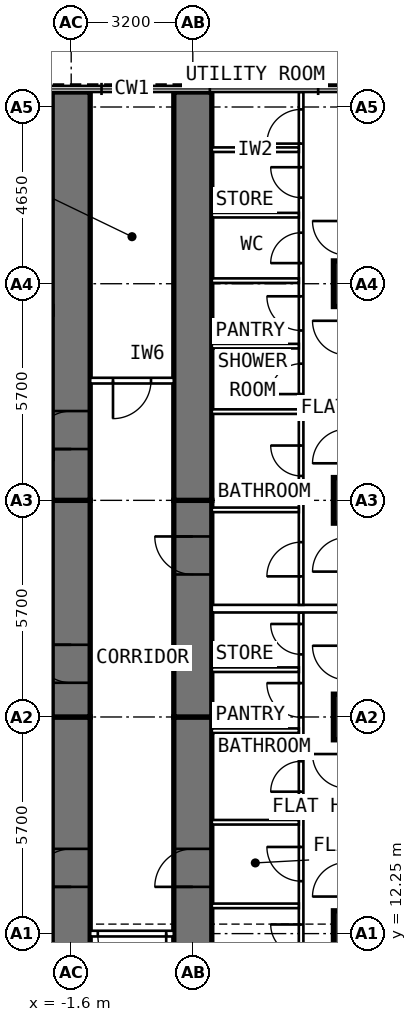
"""IFC4 building model, lengths in metres.
Left out: names, types, materials, properties, quantities, classifications, styles, units other than length and angle.
Written with IfcOpenShell. Run it as: python <this file> out.ifc"""

import sys

from ifc_helpers import new_model, si_unit, direction, frame, frame_2d, origin, origin_2d, place, context, subcontext, project, spatial, rectangle, extrude, element, fill, save


model = new_model("IFC4")
c1 = context("Model", 3, precision=1e-05, world=origin(), true_north=direction((0.0, 1.0)))
c2 = subcontext(c1, "Body", "Model", "MODEL_VIEW")
j1 = project(units=[si_unit("LENGTHUNIT", "METRE"), si_unit("PLANEANGLEUNIT", "RADIAN")], contexts=[c1])
p1 = place(None, origin())
s1 = spatial("IfcSite", under=j1, at=p1, CompositionType="ELEMENT")
p2 = place(p1, origin())
s2 = spatial("IfcBuilding", under=s1, at=p2, CompositionType="ELEMENT")
p3 = place(p2, frame((0.0, 0.0, 80.8)))
s3 = spatial("IfcBuildingStorey", under=s2, at=p3, CompositionType="ELEMENT", Elevation=80.8)
for number, where, z_axis, x_axis in (
    (1, (5.9, 12.25, 0.0), (0.0, 0.0, 1.0), (0.0, 1.0, 0.0)),
    (2, (5.9, 17.95, 0.0), (0.0, 0.0, 1.0), (0.0, 1.0, 0.0)),
    (3, (5.9, 23.65, 0.0), (0.0, 0.0, 1.0), (0.0, 1.0, 0.0)),
    (4, (5.9, 29.35, 0.0), (0.0, 0.0, 1.0), (0.0, 1.0, 0.0)),
):
    element("IfcColumn", number, at=place(p3, frame(where, z_axis=z_axis, x_axis=x_axis)), inside=s3, PredefinedType="COLUMN", context=c2, shape_type="SweptSolid", body=[
        extrude(rectangle(XDim=1.2, YDim=1.2, at=origin_2d()), origin(), (0.0, 0.0, 1.0), 3.6),
    ])
p4 = place(p3, frame((-1.6, 9.6, 0.0), z_axis=(0.0, 0.0, 1.0), x_axis=(0.0, 1.0, 0.0)))
e5 = element("IfcWall", 5, at=p4, inside=s3, PredefinedType="SHEAR", context=c2, shape_type="SweptSolid", body=[
    extrude(rectangle(XDim=8.35, YDim=1.0, at=frame_2d((4.175, 0.0))), origin(), (0.0, 0.0, 1.0), 3.6),
])
p5 = place(p4, frame((3.88, 0.0, 0.0)))
e6 = element("IfcOpeningElement", 6, at=p5, cuts=e5, PredefinedType="OPENING", context=c2, shape_type="SweptSolid", body=[
    extrude(rectangle(XDim=1.0, YDim=2.1, at=frame_2d((0.5, 1.05))), frame((0.0, 0.512, 0.0), z_axis=(0.0, -1.0, 0.0), x_axis=(1.0, 0.0, 0.0)), (0.0, 0.0, 1.0), 1.024),
])
p6 = place(p3, frame((-1.6, 17.95, 0.0), z_axis=(0.0, 0.0, 1.0), x_axis=(0.0, 1.0, 0.0)))
e7 = element("IfcWall", 7, at=p6, inside=s3, PredefinedType="SHEAR", context=c2, shape_type="SweptSolid", body=[
    extrude(rectangle(XDim=5.7, YDim=1.0, at=frame_2d((2.85, 0.0))), origin(), (0.0, 0.0, 1.0), 3.6),
])
p7 = place(p6, frame((0.9, 0.0, 0.0)))
e8 = element("IfcOpeningElement", 8, at=p7, cuts=e7, PredefinedType="OPENING", context=c2, shape_type="SweptSolid", body=[
    extrude(rectangle(XDim=1.0, YDim=2.1, at=frame_2d((0.5, 1.05))), frame((0.0, 0.512, 0.0), z_axis=(0.0, -1.0, 0.0), x_axis=(1.0, 0.0, 0.0)), (0.0, 0.0, 1.0), 1.024),
])
p8 = place(p3, frame((-1.6, 23.65, 0.0), z_axis=(0.0, 0.0, 1.0), x_axis=(0.0, 1.0, 0.0)))
e9 = element("IfcWall", 9, at=p8, inside=s3, PredefinedType="SHEAR", context=c2, shape_type="SweptSolid", body=[
    extrude(rectangle(XDim=10.745, YDim=1.0, at=frame_2d((5.373, 0.0))), origin(), (0.0, 0.0, 1.0), 3.6),
])
p9 = place(p8, frame((1.35, 0.0, 0.0)))
e10 = element("IfcOpeningElement", 10, at=p9, cuts=e9, PredefinedType="OPENING", context=c2, shape_type="SweptSolid", body=[
    extrude(rectangle(XDim=1.0, YDim=2.1, at=frame_2d((0.5, 1.05))), frame((0.0, 0.512, 0.0), z_axis=(0.0, -1.0, 0.0), x_axis=(1.0, 0.0, 0.0)), (0.0, 0.0, 1.0), 1.024),
])
p10 = place(p3, frame((1.6, 9.6, 0.0), z_axis=(0.0, 0.0, 1.0), x_axis=(0.0, 1.0, 0.0)))
e11 = element("IfcWall", 11, at=p10, inside=s3, PredefinedType="SHEAR", context=c2, shape_type="SweptSolid", body=[
    extrude(rectangle(XDim=8.35, YDim=1.0, at=frame_2d((4.175, 0.0))), origin(), (0.0, 0.0, 1.0), 3.6),
])
p11 = place(p10, frame((3.88, 0.0, 0.0)))
e12 = element("IfcOpeningElement", 12, at=p11, cuts=e11, PredefinedType="OPENING", context=c2, shape_type="SweptSolid", body=[
    extrude(rectangle(XDim=1.0, YDim=2.1, at=frame_2d((0.5, 1.05))), frame((0.0, 0.512, 0.0), z_axis=(0.0, -1.0, 0.0), x_axis=(1.0, 0.0, 0.0)), (0.0, 0.0, 1.0), 1.024),
])
p12 = place(p3, frame((1.6, 17.95, 0.0), z_axis=(0.0, 0.0, 1.0), x_axis=(0.0, 1.0, 0.0)))
e13 = element("IfcWall", 13, at=p12, inside=s3, PredefinedType="SHEAR", context=c2, shape_type="SweptSolid", body=[
    extrude(rectangle(XDim=5.7, YDim=1.0, at=frame_2d((2.85, 0.0))), origin(), (0.0, 0.0, 1.0), 3.6),
])
p13 = place(p12, frame((3.75, 0.0, 0.0)))
e14 = element("IfcOpeningElement", 14, at=p13, cuts=e13, PredefinedType="OPENING", context=c2, shape_type="SweptSolid", body=[
    extrude(rectangle(XDim=1.0, YDim=2.1, at=frame_2d((0.5, 1.05))), frame((0.0, 0.512, 0.0), z_axis=(0.0, -1.0, 0.0), x_axis=(1.0, 0.0, 0.0)), (0.0, 0.0, 1.0), 1.024),
])
p14 = place(p3, frame((1.6, 23.65, 0.0), z_axis=(0.0, 0.0, 1.0), x_axis=(0.0, 1.0, 0.0)))
e15 = element("IfcWall", 15, at=p14, inside=s3, PredefinedType="SHEAR", context=c2, shape_type="SweptSolid", body=[
    extrude(rectangle(XDim=10.745, YDim=1.0, at=frame_2d((5.373, 0.0))), origin(), (0.0, 0.0, 1.0), 3.6),
])
p15 = place(p3, frame((-2.1, 17.95, 0.0), z_axis=(0.0, 0.0, 1.0), x_axis=(-1.0, 0.0, 0.0)))
e16 = element("IfcWall", 16, at=p15, inside=s3, PredefinedType="PARTITIONING", context=c2, shape_type="SweptSolid", body=[
    extrude(rectangle(XDim=8.6, YDim=0.2, at=frame_2d((4.3, 0.0))), origin(), (0.0, 0.0, 1.0), 2.45),
])
p16 = place(p3, frame((4.45, 10.1, 0.0), z_axis=(0.0, 0.0, 1.0), x_axis=(0.0, 1.0, 0.0)))
e17 = element("IfcWall", 17, at=p16, inside=s3, PredefinedType="PARTITIONING", context=c2, shape_type="SweptSolid", body=[
    extrude(rectangle(XDim=10.6, YDim=0.12, at=frame_2d((5.3, 0.0))), origin(), (0.0, 0.0, 1.0), 3.35),
])
p17 = place(p16, frame((1.59, 0.0, 0.0)))
e18 = element("IfcOpeningElement", 18, at=p17, cuts=e17, PredefinedType="OPENING", context=c2, shape_type="SweptSolid", body=[
    extrude(rectangle(XDim=0.8, YDim=2.1, at=frame_2d((0.4, 1.05))), frame((0.0, 0.072, 0.0), z_axis=(0.0, -1.0, 0.0), x_axis=(1.0, 0.0, 0.0)), (0.0, 0.0, 1.0), 0.144),
])
p18 = place(p16, frame((3.53, 0.0, 0.0)))
e19 = element("IfcOpeningElement", 19, at=p18, cuts=e17, PredefinedType="OPENING", context=c2, shape_type="SweptSolid", body=[
    extrude(rectangle(XDim=0.9, YDim=2.1, at=frame_2d((0.45, 1.05))), frame((0.0, 0.072, 0.0), z_axis=(0.0, -1.0, 0.0), x_axis=(1.0, 0.0, 0.0)), (0.0, 0.0, 1.0), 0.144),
])
p19 = place(p16, frame((5.884, 0.0, 0.0)))
e20 = element("IfcOpeningElement", 20, at=p19, cuts=e17, PredefinedType="OPENING", context=c2, shape_type="SweptSolid", body=[
    extrude(rectangle(XDim=0.8, YDim=2.1, at=frame_2d((0.4, 1.05))), frame((0.0, 0.072, 0.0), z_axis=(0.0, -1.0, 0.0), x_axis=(1.0, 0.0, 0.0)), (0.0, 0.0, 1.0), 0.144),
])
p20 = place(p16, frame((7.842, 0.0, 0.0)))
e21 = element("IfcOpeningElement", 21, at=p20, cuts=e17, PredefinedType="OPENING", context=c2, shape_type="SweptSolid", body=[
    extrude(rectangle(XDim=0.9, YDim=2.1, at=frame_2d((0.45, 1.05))), frame((0.0, 0.072, 0.0), z_axis=(0.0, -1.0, 0.0), x_axis=(1.0, 0.0, 0.0)), (0.0, 0.0, 1.0), 0.144),
])
p21 = place(p16, frame((9.497, 0.0, 0.0)))
e22 = element("IfcOpeningElement", 22, at=p21, cuts=e17, PredefinedType="OPENING", context=c2, shape_type="SweptSolid", body=[
    extrude(rectangle(XDim=0.8, YDim=2.1, at=frame_2d((0.4, 1.05))), frame((0.0, 0.072, 0.0), z_axis=(0.0, -1.0, 0.0), x_axis=(1.0, 0.0, 0.0)), (0.0, 0.0, 1.0), 0.144),
])
for number, where, z_axis, x_axis in (
    (23, (2.1, 12.98, 0.0), (0.0, 0.0, 1.0), (1.0, 0.0, 0.0)),
    (24, (2.1, 15.18, 0.0), (0.0, 0.0, 1.0), (1.0, 0.0, 0.0)),
):
    element("IfcWall", number, at=place(p3, frame(where, z_axis=z_axis, x_axis=x_axis)), inside=s3, PredefinedType="PARTITIONING", context=c2, shape_type="SweptSolid", body=[
        extrude(rectangle(XDim=2.29, YDim=0.12, at=frame_2d((1.145, 0.0))), origin(), (0.0, 0.0, 1.0), 3.35),
    ])
p22 = place(p3, frame((2.1, 17.589, 0.0), z_axis=(0.0, 0.0, 1.0), x_axis=(1.0, 0.0, 0.0)))
e25 = element("IfcWall", 25, at=p22, inside=s3, PredefinedType="PARTITIONING", context=c2, shape_type="SweptSolid", body=[
    extrude(rectangle(XDim=2.29, YDim=0.12, at=frame_2d((1.145, 0.0))), origin(), (0.0, 0.0, 1.0), 2.45),
])
p23 = place(p3, frame((2.1, 19.194, 0.0), z_axis=(0.0, 0.0, 1.0), x_axis=(1.0, 0.0, 0.0)))
e26 = element("IfcWall", 26, at=p23, inside=s3, PredefinedType="PARTITIONING", context=c2, shape_type="SweptSolid", body=[
    extrude(rectangle(XDim=2.29, YDim=0.12, at=frame_2d((1.145, 0.0))), origin(), (0.0, 0.0, 1.0), 3.35),
])
p24 = place(p3, frame((4.45, 20.9, 0.0), z_axis=(0.0, 0.0, 1.0), x_axis=(0.0, 1.0, 0.0)))
e27 = element("IfcWall", 27, at=p24, inside=s3, PredefinedType="PARTITIONING", context=c2, shape_type="SweptSolid", body=[
    extrude(rectangle(XDim=13.495, YDim=0.12, at=frame_2d((6.748, 0.0))), origin(), (0.0, 0.0, 1.0), 3.35),
])
p25 = place(p24, frame((0.75, 0.0, 0.0)))
e28 = element("IfcOpeningElement", 28, at=p25, cuts=e27, PredefinedType="OPENING", context=c2, shape_type="SweptSolid", body=[
    extrude(rectangle(XDim=0.9, YDim=2.1, at=frame_2d((0.45, 1.05))), frame((0.0, 0.072, 0.0), z_axis=(0.0, -1.0, 0.0), x_axis=(1.0, 0.0, 0.0)), (0.0, 0.0, 1.0), 0.144),
])
p26 = place(p24, frame((3.392, 0.0, 0.0)))
e29 = element("IfcOpeningElement", 29, at=p26, cuts=e27, PredefinedType="OPENING", context=c2, shape_type="SweptSolid", body=[
    extrude(rectangle(XDim=0.8, YDim=2.1, at=frame_2d((0.4, 1.05))), frame((0.0, 0.072, 0.0), z_axis=(0.0, -1.0, 0.0), x_axis=(1.0, 0.0, 0.0)), (0.0, 0.0, 1.0), 0.144),
])
p27 = place(p24, frame((5.546, 0.0, 0.0)))
e30 = element("IfcOpeningElement", 30, at=p27, cuts=e27, PredefinedType="OPENING", context=c2, shape_type="SweptSolid", body=[
    extrude(rectangle(XDim=0.8, YDim=2.1, at=frame_2d((0.4, 1.05))), frame((0.0, 0.072, 0.0), z_axis=(0.0, -1.0, 0.0), x_axis=(1.0, 0.0, 0.0)), (0.0, 0.0, 1.0), 0.144),
])
p28 = place(p24, frame((7.219, 0.0, 0.0)))
e31 = element("IfcOpeningElement", 31, at=p28, cuts=e27, PredefinedType="OPENING", context=c2, shape_type="SweptSolid", body=[
    extrude(rectangle(XDim=0.9, YDim=2.1, at=frame_2d((0.45, 1.05))), frame((0.0, 0.072, 0.0), z_axis=(0.0, -1.0, 0.0), x_axis=(1.0, 0.0, 0.0)), (0.0, 0.0, 1.0), 0.144),
])
p29 = place(p24, frame((8.992, 0.0, 0.0)))
e32 = element("IfcOpeningElement", 32, at=p29, cuts=e27, PredefinedType="OPENING", context=c2, shape_type="SweptSolid", body=[
    extrude(rectangle(XDim=0.8, YDim=2.1, at=frame_2d((0.4, 1.05))), frame((0.0, 0.072, 0.0), z_axis=(0.0, -1.0, 0.0), x_axis=(1.0, 0.0, 0.0)), (0.0, 0.0, 1.0), 0.144),
])
p30 = place(p24, frame((10.715, 0.0, 0.0)))
e33 = element("IfcOpeningElement", 33, at=p30, cuts=e27, PredefinedType="OPENING", context=c2, shape_type="SweptSolid", body=[
    extrude(rectangle(XDim=0.8, YDim=2.1, at=frame_2d((0.4, 1.05))), frame((0.0, 0.072, 0.0), z_axis=(0.0, -1.0, 0.0), x_axis=(1.0, 0.0, 0.0)), (0.0, 0.0, 1.0), 0.144),
])
p31 = place(p24, frame((12.137, 0.0, 0.0)))
e34 = element("IfcOpeningElement", 34, at=p31, cuts=e27, PredefinedType="OPENING", context=c2, shape_type="SweptSolid", body=[
    extrude(rectangle(XDim=0.9, YDim=2.1, at=frame_2d((0.45, 1.05))), frame((0.0, 0.072, 0.0), z_axis=(0.0, -1.0, 0.0), x_axis=(1.0, 0.0, 0.0)), (0.0, 0.0, 1.0), 0.144),
])
p32 = place(p3, frame((2.1, 23.4, 0.0), z_axis=(0.0, 0.0, 1.0), x_axis=(1.0, 0.0, 0.0)))
e35 = element("IfcWall", 35, at=p32, inside=s3, PredefinedType="PARTITIONING", context=c2, shape_type="SweptSolid", body=[
    extrude(rectangle(XDim=2.29, YDim=0.12, at=frame_2d((1.145, 0.0))), origin(), (0.0, 0.0, 1.0), 2.45),
])
for number, where, z_axis, x_axis in (
    (36, (2.1, 25.985, 0.0), (0.0, 0.0, 1.0), (1.0, 0.0, 0.0)),
    (37, (2.1, 27.708, 0.0), (0.0, 0.0, 1.0), (1.0, 0.0, 0.0)),
):
    element("IfcWall", number, at=place(p3, frame(where, z_axis=z_axis, x_axis=x_axis)), inside=s3, PredefinedType="PARTITIONING", context=c2, shape_type="SweptSolid", body=[
        extrude(rectangle(XDim=2.29, YDim=0.12, at=frame_2d((1.145, 0.0))), origin(), (0.0, 0.0, 1.0), 3.35),
    ])
p33 = place(p3, frame((2.1, 29.431, 0.0), z_axis=(0.0, 0.0, 1.0), x_axis=(1.0, 0.0, 0.0)))
e38 = element("IfcWall", 38, at=p33, inside=s3, PredefinedType="PARTITIONING", context=c2, shape_type="SweptSolid", body=[
    extrude(rectangle(XDim=2.29, YDim=0.12, at=frame_2d((1.145, 0.0))), origin(), (0.0, 0.0, 1.0), 2.45),
])
for number, where, z_axis, x_axis in (
    (39, (2.1, 31.154, 0.0), (0.0, 0.0, 1.0), (1.0, 0.0, 0.0)),
    (40, (2.1, 32.877, 0.0), (0.0, 0.0, 1.0), (1.0, 0.0, 0.0)),
):
    element("IfcWall", number, at=place(p3, frame(where, z_axis=z_axis, x_axis=x_axis)), inside=s3, PredefinedType="PARTITIONING", context=c2, shape_type="SweptSolid", body=[
        extrude(rectangle(XDim=2.29, YDim=0.12, at=frame_2d((1.145, 0.0))), origin(), (0.0, 0.0, 1.0), 3.35),
    ])
p34 = place(p3, frame((2.1, 20.8, 0.0), z_axis=(0.0, 0.0, 1.0), x_axis=(1.0, 0.0, 0.0)))
e41 = element("IfcWall", 41, at=p34, inside=s3, PredefinedType="PARTITIONING", context=c2, shape_type="SweptSolid", body=[
    extrude(rectangle(XDim=8.6, YDim=0.2, at=frame_2d((4.3, 0.0))), origin(), (0.0, 0.0, 1.0), 3.35),
])
p35 = place(p3, frame((1.1, 26.8, 0.0), z_axis=(0.0, 0.0, 1.0), x_axis=(-1.0, 0.0, 0.0)))
e42 = element("IfcWall", 42, at=p35, inside=s3, PredefinedType="PARTITIONING", context=c2, shape_type="SweptSolid", body=[
    extrude(rectangle(XDim=2.2, YDim=0.15, at=frame_2d((1.1, 0.0))), origin(), (0.0, 0.0, 1.0), 3.35),
])
p36 = place(p35, frame((0.6, 0.0, 0.0)))
e43 = element("IfcOpeningElement", 43, at=p36, cuts=e42, PredefinedType="OPENING", context=c2, shape_type="SweptSolid", body=[
    extrude(rectangle(XDim=1.0, YDim=2.1, at=frame_2d((0.5, 1.05))), frame((0.0, 0.087, 0.0), z_axis=(0.0, -1.0, 0.0), x_axis=(1.0, 0.0, 0.0)), (0.0, 0.0, 1.0), 0.174),
])
p37 = place(p3, frame((1.1, 12.25, 0.0), z_axis=(0.0, 0.0, 1.0), x_axis=(-1.0, 0.0, 0.0)))
e44 = element("IfcWall", 44, at=p37, inside=s3, PredefinedType="PARTITIONING", context=c2, shape_type="SweptSolid", body=[
    extrude(rectangle(XDim=2.2, YDim=0.15, at=frame_2d((1.1, 0.0))), origin(), (0.0, 0.0, 1.0), 3.35),
])
p38 = place(p37, frame((0.2, 0.0, 0.0)))
e45 = element("IfcOpeningElement", 45, at=p38, cuts=e44, PredefinedType="OPENING", context=c2, shape_type="SweptSolid", body=[
    extrude(rectangle(XDim=1.8, YDim=2.1, at=frame_2d((0.9, 1.05))), frame((0.0, 0.087, 0.0), z_axis=(0.0, -1.0, 0.0), x_axis=(1.0, 0.0, 0.0)), (0.0, 0.0, 1.0), 0.174),
])
p39 = place(p5, origin())
e46 = element("IfcDoor", 46, at=p39, inside=s3, OperationType="SINGLE_SWING_LEFT", PredefinedType="DOOR", context=c2, shape_type="SweptSolid", body=[
    extrude(rectangle(XDim=1.0, YDim=2.1, at=frame_2d((0.5, 1.05))), frame((0.0, 0.25, 0.0), z_axis=(0.0, -1.0, 0.0), x_axis=(1.0, 0.0, 0.0)), (0.0, 0.0, 1.0), 0.5),
])
fill(e6, e46)
p40 = place(p7, origin())
e47 = element("IfcDoor", 47, at=p40, inside=s3, OperationType="SINGLE_SWING_RIGHT", PredefinedType="DOOR", context=c2, shape_type="SweptSolid", body=[
    extrude(rectangle(XDim=1.0, YDim=2.1, at=frame_2d((0.5, 1.05))), frame((0.0, 0.25, 0.0), z_axis=(0.0, -1.0, 0.0), x_axis=(1.0, 0.0, 0.0)), (0.0, 0.0, 1.0), 0.5),
])
fill(e8, e47)
p41 = place(p11, origin())
e48 = element("IfcDoor", 48, at=p41, inside=s3, OperationType="SINGLE_SWING_LEFT", PredefinedType="DOOR", context=c2, shape_type="SweptSolid", body=[
    extrude(rectangle(XDim=1.0, YDim=2.1, at=frame_2d((0.5, 1.05))), frame((0.0, 0.25, 0.0), z_axis=(0.0, -1.0, 0.0), x_axis=(1.0, 0.0, 0.0)), (0.0, 0.0, 1.0), 0.5),
])
fill(e12, e48)
p42 = place(p17, origin())
e49 = element("IfcDoor", 49, at=p42, inside=s3, OperationType="SINGLE_SWING_RIGHT", PredefinedType="DOOR", context=c2, shape_type="SweptSolid", body=[
    extrude(rectangle(XDim=0.8, YDim=2.1, at=frame_2d((0.4, 1.05))), frame((0.0, 0.025, 0.0), z_axis=(0.0, -1.0, 0.0), x_axis=(1.0, 0.0, 0.0)), (0.0, 0.0, 1.0), 0.05),
])
fill(e18, e49)
p43 = place(p18, origin())
e50 = element("IfcDoor", 50, at=p43, inside=s3, OperationType="SINGLE_SWING_RIGHT", PredefinedType="DOOR", context=c2, shape_type="SweptSolid", body=[
    extrude(rectangle(XDim=0.9, YDim=2.1, at=frame_2d((0.45, 1.05))), frame((0.0, 0.025, 0.0), z_axis=(0.0, -1.0, 0.0), x_axis=(1.0, 0.0, 0.0)), (0.0, 0.0, 1.0), 0.05),
])
fill(e19, e50)
p44 = place(p19, origin())
e51 = element("IfcDoor", 51, at=p44, inside=s3, OperationType="SINGLE_SWING_LEFT", PredefinedType="DOOR", context=c2, shape_type="SweptSolid", body=[
    extrude(rectangle(XDim=0.8, YDim=2.1, at=frame_2d((0.4, 1.05))), frame((0.0, 0.025, 0.0), z_axis=(0.0, -1.0, 0.0), x_axis=(1.0, 0.0, 0.0)), (0.0, 0.0, 1.0), 0.05),
])
fill(e20, e51)
p45 = place(p20, origin())
e52 = element("IfcDoor", 52, at=p45, inside=s3, OperationType="SINGLE_SWING_RIGHT", PredefinedType="DOOR", context=c2, shape_type="SweptSolid", body=[
    extrude(rectangle(XDim=0.9, YDim=2.1, at=frame_2d((0.45, 1.05))), frame((0.0, 0.025, 0.0), z_axis=(0.0, -1.0, 0.0), x_axis=(1.0, 0.0, 0.0)), (0.0, 0.0, 1.0), 0.05),
])
fill(e21, e52)
p46 = place(p21, origin())
e53 = element("IfcDoor", 53, at=p46, inside=s3, OperationType="SINGLE_SWING_RIGHT", PredefinedType="DOOR", context=c2, shape_type="SweptSolid", body=[
    extrude(rectangle(XDim=0.8, YDim=2.1, at=frame_2d((0.4, 1.05))), frame((0.0, 0.025, 0.0), z_axis=(0.0, -1.0, 0.0), x_axis=(1.0, 0.0, 0.0)), (0.0, 0.0, 1.0), 0.05),
])
fill(e22, e53)
p47 = place(p13, origin())
e54 = element("IfcDoor", 54, at=p47, inside=s3, OperationType="SINGLE_SWING_RIGHT", PredefinedType="DOOR", context=c2, shape_type="SweptSolid", body=[
    extrude(rectangle(XDim=1.0, YDim=2.1, at=frame_2d((0.5, 1.05))), frame((0.0, 0.25, 0.0), z_axis=(0.0, -1.0, 0.0), x_axis=(1.0, 0.0, 0.0)), (0.0, 0.0, 1.0), 0.5),
])
fill(e14, e54)
p48 = place(p25, origin())
e55 = element("IfcDoor", 55, at=p48, inside=s3, OperationType="SINGLE_SWING_LEFT", PredefinedType="DOOR", context=c2, shape_type="SweptSolid", body=[
    extrude(rectangle(XDim=0.9, YDim=2.1, at=frame_2d((0.45, 1.05))), frame((0.0, 0.025, 0.0), z_axis=(0.0, -1.0, 0.0), x_axis=(1.0, 0.0, 0.0)), (0.0, 0.0, 1.0), 0.05),
])
fill(e28, e55)
p49 = place(p26, origin())
e56 = element("IfcDoor", 56, at=p49, inside=s3, OperationType="SINGLE_SWING_RIGHT", PredefinedType="DOOR", context=c2, shape_type="SweptSolid", body=[
    extrude(rectangle(XDim=0.8, YDim=2.1, at=frame_2d((0.4, 1.05))), frame((0.0, 0.025, 0.0), z_axis=(0.0, -1.0, 0.0), x_axis=(1.0, 0.0, 0.0)), (0.0, 0.0, 1.0), 0.05),
])
fill(e29, e56)
p50 = place(p27, origin())
e57 = element("IfcDoor", 57, at=p50, inside=s3, OperationType="SINGLE_SWING_LEFT", PredefinedType="DOOR", context=c2, shape_type="SweptSolid", body=[
    extrude(rectangle(XDim=0.8, YDim=2.1, at=frame_2d((0.4, 1.05))), frame((0.0, 0.025, 0.0), z_axis=(0.0, -1.0, 0.0), x_axis=(1.0, 0.0, 0.0)), (0.0, 0.0, 1.0), 0.05),
])
fill(e30, e57)
p51 = place(p28, origin())
e58 = element("IfcDoor", 58, at=p51, inside=s3, OperationType="SINGLE_SWING_RIGHT", PredefinedType="DOOR", context=c2, shape_type="SweptSolid", body=[
    extrude(rectangle(XDim=0.9, YDim=2.1, at=frame_2d((0.45, 1.05))), frame((0.0, 0.025, 0.0), z_axis=(0.0, -1.0, 0.0), x_axis=(1.0, 0.0, 0.0)), (0.0, 0.0, 1.0), 0.05),
])
fill(e31, e58)
p52 = place(p29, origin())
e59 = element("IfcDoor", 59, at=p52, inside=s3, OperationType="SINGLE_SWING_LEFT", PredefinedType="DOOR", context=c2, shape_type="SweptSolid", body=[
    extrude(rectangle(XDim=0.8, YDim=2.1, at=frame_2d((0.4, 1.05))), frame((0.0, 0.025, 0.0), z_axis=(0.0, -1.0, 0.0), x_axis=(1.0, 0.0, 0.0)), (0.0, 0.0, 1.0), 0.05),
])
fill(e32, e59)
p53 = place(p30, origin())
e60 = element("IfcDoor", 60, at=p53, inside=s3, OperationType="SINGLE_SWING_RIGHT", PredefinedType="DOOR", context=c2, shape_type="SweptSolid", body=[
    extrude(rectangle(XDim=0.8, YDim=2.1, at=frame_2d((0.4, 1.05))), frame((0.0, 0.025, 0.0), z_axis=(0.0, -1.0, 0.0), x_axis=(1.0, 0.0, 0.0)), (0.0, 0.0, 1.0), 0.05),
])
fill(e33, e60)
p54 = place(p31, origin())
e61 = element("IfcDoor", 61, at=p54, inside=s3, OperationType="SINGLE_SWING_LEFT", PredefinedType="DOOR", context=c2, shape_type="SweptSolid", body=[
    extrude(rectangle(XDim=0.9, YDim=2.1, at=frame_2d((0.45, 1.05))), frame((0.0, 0.025, 0.0), z_axis=(0.0, -1.0, 0.0), x_axis=(1.0, 0.0, 0.0)), (0.0, 0.0, 1.0), 0.05),
])
fill(e34, e61)
p55 = place(p36, origin())
e62 = element("IfcDoor", 62, at=p55, inside=s3, OperationType="SINGLE_SWING_RIGHT", PredefinedType="DOOR", context=c2, shape_type="SweptSolid", body=[
    extrude(rectangle(XDim=1.0, YDim=2.1, at=frame_2d((0.5, 1.05))), frame((0.0, 0.025, 0.0), z_axis=(0.0, -1.0, 0.0), x_axis=(1.0, 0.0, 0.0)), (0.0, 0.0, 1.0), 0.05),
])
fill(e43, e62)
p56 = place(p38, origin())
e63 = element("IfcDoor", 63, at=p56, inside=s3, OperationType="DOUBLE_DOOR_DOUBLE_SWING", PredefinedType="DOOR", context=c2, shape_type="SweptSolid", body=[
    extrude(rectangle(XDim=1.8, YDim=2.1, at=frame_2d((0.9, 1.05))), frame((0.0, 0.025, 0.0), z_axis=(0.0, -1.0, 0.0), x_axis=(1.0, 0.0, 0.0)), (0.0, 0.0, 1.0), 0.05),
])
fill(e45, e63)
p57 = place(p9, origin())
e64 = element("IfcDoor", 64, at=p57, inside=s3, OperationType="SINGLE_SWING_LEFT", PredefinedType="DOOR", context=c2, shape_type="SweptSolid", body=[
    extrude(rectangle(XDim=1.0, YDim=2.1, at=frame_2d((0.5, 1.05))), frame((0.0, 0.25, 0.0), z_axis=(0.0, -1.0, 0.0), x_axis=(1.0, 0.0, 0.0)), (0.0, 0.0, 1.0), 0.5),
])
fill(e10, e64)
save(model, sys.argv[1])
